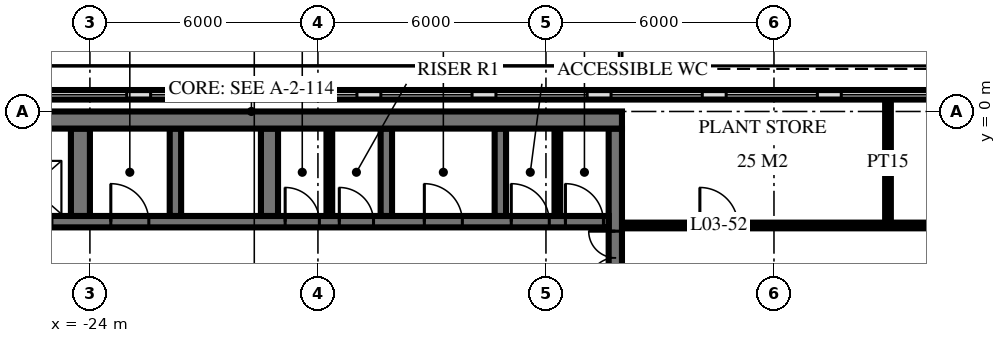
"""IFC4 building model, lengths in metres.
Left out: names, types, materials, properties, quantities, classifications, styles, units other than length and angle.
Written with IfcOpenShell. Run it as: python <this file> out.ifc"""

import sys

from ifc_helpers import new_model, si_unit, direction, frame, frame_2d, origin, place, context, subcontext, project, spatial, rectangle, extrude, element, fill, save


model = new_model("IFC4")
c1 = context("Model", 3, precision=1e-05, world=origin(), true_north=direction((0.0, 1.0)))
c2 = subcontext(c1, "Body", "Model", "MODEL_VIEW")
j1 = project(units=[si_unit("LENGTHUNIT", "METRE"), si_unit("PLANEANGLEUNIT", "RADIAN")], contexts=[c1])
p1 = place(None, origin())
s1 = spatial("IfcSite", under=j1, at=p1, CompositionType="ELEMENT")
p2 = place(p1, origin())
s2 = spatial("IfcBuilding", under=s1, at=p2, CompositionType="ELEMENT")
p3 = place(p2, frame((0.0, 0.0, 18.0)))
s3 = spatial("IfcBuildingStorey", under=s2, at=p3, CompositionType="ELEMENT", Elevation=18.0)
p4 = place(p3, frame((-29.5, -0.225, 0.0), z_axis=(0.0, 0.0, 1.0), x_axis=(1.0, 0.0, 0.0)))
e1 = element("IfcWall", 1, at=p4, inside=s3, PredefinedType="SHEAR", context=c2, shape_type="SweptSolid", body=[
    extrude(rectangle(XDim=19.5, YDim=0.45, at=frame_2d((9.75, 0.0))), origin(), (0.0, 0.0, 1.0), 6.0),
])
p5 = place(p3, frame((-10.175, -14.55, 0.0), z_axis=(0.0, 0.0, 1.0), x_axis=(0.0, 1.0, 0.0)))
e2 = element("IfcWall", 2, at=p5, inside=s3, PredefinedType="SHEAR", context=c2, shape_type="SweptSolid", body=[
    extrude(rectangle(XDim=14.1, YDim=0.35, at=frame_2d((7.05, 0.0))), origin(), (0.0, 0.0, 1.0), 6.0),
])
p6 = place(p5, frame((8.4, 0.0, 0.0)))
e3 = element("IfcOpeningElement", 3, at=p6, cuts=e2, PredefinedType="OPENING", context=c2, shape_type="SweptSolid", body=[
    extrude(rectangle(XDim=1.4, YDim=2.4, at=frame_2d((0.7, 1.2))), frame((0.0, 0.185, 0.0), z_axis=(0.0, -1.0, 0.0), x_axis=(1.0, 0.0, 0.0)), (0.0, 0.0, 1.0), 0.37),
])
p7 = place(p5, frame((10.0, 0.0, 0.0)))
e4 = element("IfcOpeningElement", 4, at=p7, cuts=e2, PredefinedType="OPENING", context=c2, shape_type="SweptSolid", body=[
    extrude(rectangle(XDim=1.4, YDim=2.4, at=frame_2d((0.7, 1.2))), frame((0.0, 0.185, 0.0), z_axis=(0.0, -1.0, 0.0), x_axis=(1.0, 0.0, 0.0)), (0.0, 0.0, 1.0), 0.37),
])
p8 = place(p5, frame((4.0, 0.0, 0.0)))
e5 = element("IfcOpeningElement", 5, at=p8, cuts=e2, PredefinedType="OPENING", context=c2, shape_type="SweptSolid", body=[
    extrude(rectangle(XDim=1.2, YDim=2.1, at=frame_2d((0.6, 1.05))), frame((0.0, 0.185, 0.0), z_axis=(0.0, -1.0, 0.0), x_axis=(1.0, 0.0, 0.0)), (0.0, 0.0, 1.0), 0.37),
])
p9 = place(p3, frame((-29.05, -2.9, 0.0), z_axis=(0.0, 0.0, 1.0), x_axis=(1.0, 0.0, 0.0)))
e6 = element("IfcWall", 6, at=p9, inside=s3, PredefinedType="SHEAR", context=c2, shape_type="SweptSolid", body=[
    extrude(rectangle(XDim=18.7, YDim=0.3, at=frame_2d((9.35, 0.0))), origin(), (0.0, 0.0, 1.0), 6.0),
])
p10 = place(p9, frame((2.95, 0.0, 0.0)))
e7 = element("IfcOpeningElement", 7, at=p10, cuts=e6, PredefinedType="OPENING", context=c2, shape_type="SweptSolid", body=[
    extrude(rectangle(XDim=1.1, YDim=2.1, at=frame_2d((0.55, 1.05))), frame((0.0, 0.16, 0.0), z_axis=(0.0, -1.0, 0.0), x_axis=(1.0, 0.0, 0.0)), (0.0, 0.0, 1.0), 0.32),
])
p11 = place(p9, frame((0.55, 0.0, 0.0)))
e8 = element("IfcOpeningElement", 8, at=p11, cuts=e6, PredefinedType="OPENING", context=c2, shape_type="SweptSolid", body=[
    extrude(rectangle(XDim=1.1, YDim=2.1, at=frame_2d((0.55, 1.05))), frame((0.0, 0.16, 0.0), z_axis=(0.0, -1.0, 0.0), x_axis=(1.0, 0.0, 0.0)), (0.0, 0.0, 1.0), 0.32),
])
p12 = place(p9, frame((11.613, 0.0, 0.0)))
e9 = element("IfcOpeningElement", 9, at=p12, cuts=e6, PredefinedType="OPENING", context=c2, shape_type="SweptSolid", body=[
    extrude(rectangle(XDim=0.9, YDim=2.1, at=frame_2d((0.45, 1.05))), frame((0.0, 0.16, 0.0), z_axis=(0.0, -1.0, 0.0), x_axis=(1.0, 0.0, 0.0)), (0.0, 0.0, 1.0), 0.32),
])
p13 = place(p9, frame((10.188, 0.0, 0.0)))
e10 = element("IfcOpeningElement", 10, at=p13, cuts=e6, PredefinedType="OPENING", context=c2, shape_type="SweptSolid", body=[
    extrude(rectangle(XDim=0.9, YDim=2.1, at=frame_2d((0.45, 1.05))), frame((0.0, 0.16, 0.0), z_axis=(0.0, -1.0, 0.0), x_axis=(1.0, 0.0, 0.0)), (0.0, 0.0, 1.0), 0.32),
])
p14 = place(p9, frame((17.562, 0.0, 0.0)))
e11 = element("IfcOpeningElement", 11, at=p14, cuts=e6, PredefinedType="OPENING", context=c2, shape_type="SweptSolid", body=[
    extrude(rectangle(XDim=1.0, YDim=2.1, at=frame_2d((0.5, 1.05))), frame((0.0, 0.16, 0.0), z_axis=(0.0, -1.0, 0.0), x_axis=(1.0, 0.0, 0.0)), (0.0, 0.0, 1.0), 0.32),
])
p15 = place(p9, frame((16.137, 0.0, 0.0)))
e12 = element("IfcOpeningElement", 12, at=p15, cuts=e6, PredefinedType="OPENING", context=c2, shape_type="SweptSolid", body=[
    extrude(rectangle(XDim=1.0, YDim=2.1, at=frame_2d((0.5, 1.05))), frame((0.0, 0.16, 0.0), z_axis=(0.0, -1.0, 0.0), x_axis=(1.0, 0.0, 0.0)), (0.0, 0.0, 1.0), 0.32),
])
p16 = place(p9, frame((13.85, 0.0, 0.0)))
e13 = element("IfcOpeningElement", 13, at=p16, cuts=e6, PredefinedType="OPENING", context=c2, shape_type="SweptSolid", body=[
    extrude(rectangle(XDim=1.0, YDim=2.1, at=frame_2d((0.5, 1.05))), frame((0.0, 0.16, 0.0), z_axis=(0.0, -1.0, 0.0), x_axis=(1.0, 0.0, 0.0)), (0.0, 0.0, 1.0), 0.32),
])
p17 = place(p9, frame((5.6, 0.0, 0.0)))
e14 = element("IfcOpeningElement", 14, at=p17, cuts=e6, PredefinedType="OPENING", context=c2, shape_type="SweptSolid", body=[
    extrude(rectangle(XDim=1.0, YDim=2.1, at=frame_2d((0.5, 1.05))), frame((0.0, 0.16, 0.0), z_axis=(0.0, -1.0, 0.0), x_axis=(1.0, 0.0, 0.0)), (0.0, 0.0, 1.0), 0.32),
])
for number, where, z_axis, x_axis in (
    (15, (-13.2, -2.75, 0.0), (0.0, 0.0, 1.0), (0.0, 1.0, 0.0)),
    (16, (-16.2, -2.75, 0.0), (0.0, 0.0, 1.0), (0.0, 1.0, 0.0)),
):
    element("IfcWall", number, at=place(p3, frame(where, z_axis=z_axis, x_axis=x_axis)), inside=s3, PredefinedType="SHEAR", context=c2, shape_type="SweptSolid", body=[
        extrude(rectangle(XDim=2.3, YDim=0.3, at=frame_2d((1.15, 0.0))), origin(), (0.0, 0.0, 1.0), 6.0),
    ])
p18 = place(p3, frame((-19.275, -2.75, 0.0), z_axis=(0.0, 0.0, 1.0), x_axis=(0.0, 1.0, 0.0)))
e17 = element("IfcWall", 17, at=p18, inside=s3, PredefinedType="SHEAR", context=c2, shape_type="SweptSolid", body=[
    extrude(rectangle(XDim=2.3, YDim=0.45, at=frame_2d((1.15, 0.0))), origin(), (0.0, 0.0, 1.0), 6.0),
])
p19 = place(p3, frame((-21.75, -2.75, 0.0), z_axis=(0.0, 0.0, 1.0), x_axis=(0.0, 1.0, 0.0)))
e18 = element("IfcWall", 18, at=p19, inside=s3, PredefinedType="SHEAR", context=c2, shape_type="SweptSolid", body=[
    extrude(rectangle(XDim=2.3, YDim=0.3, at=frame_2d((1.15, 0.0))), origin(), (0.0, 0.0, 1.0), 6.0),
])
p20 = place(p3, frame((-24.25, -2.75, 0.0), z_axis=(0.0, 0.0, 1.0), x_axis=(0.0, 1.0, 0.0)))
e19 = element("IfcWall", 19, at=p20, inside=s3, PredefinedType="SHEAR", context=c2, shape_type="SweptSolid", body=[
    extrude(rectangle(XDim=2.3, YDim=0.5, at=frame_2d((1.15, 0.0))), origin(), (0.0, 0.0, 1.0), 6.0),
])
p21 = place(p3, frame((28.713, 0.439, 0.0), z_axis=(0.0, 0.0, 1.0), x_axis=(-1.0, 0.0, 0.0)))
e20 = element("IfcWall", 20, at=p21, inside=s3, PredefinedType="SOLIDWALL", context=c2, shape_type="SweptSolid", body=[
    extrude(rectangle(XDim=57.426, YDim=0.25, at=frame_2d((28.713, 0.0))), origin(), (0.0, 0.0, 1.0), 5.72),
])
p22 = place(p21, frame((0.252, 0.0, 0.858)))
e21 = element("IfcOpeningElement", 21, at=p22, cuts=e20, PredefinedType="OPENING", context=c2, shape_type="SweptSolid", body=[
    extrude(rectangle(XDim=2.4, YDim=3.6, at=frame_2d((1.2, 1.8))), frame((0.0, 0.135, 0.0), z_axis=(0.0, -1.0, 0.0), x_axis=(1.0, 0.0, 0.0)), (0.0, 0.0, 1.0), 0.27),
])
p23 = place(p21, frame((3.281, 0.0, 0.858)))
e22 = element("IfcOpeningElement", 22, at=p23, cuts=e20, PredefinedType="OPENING", context=c2, shape_type="SweptSolid", body=[
    extrude(rectangle(XDim=2.4, YDim=3.6, at=frame_2d((1.2, 1.8))), frame((0.0, 0.135, 0.0), z_axis=(0.0, -1.0, 0.0), x_axis=(1.0, 0.0, 0.0)), (0.0, 0.0, 1.0), 0.27),
])
p24 = place(p21, frame((6.31, 0.0, 0.858)))
e23 = element("IfcOpeningElement", 23, at=p24, cuts=e20, PredefinedType="OPENING", context=c2, shape_type="SweptSolid", body=[
    extrude(rectangle(XDim=2.4, YDim=3.6, at=frame_2d((1.2, 1.8))), frame((0.0, 0.135, 0.0), z_axis=(0.0, -1.0, 0.0), x_axis=(1.0, 0.0, 0.0)), (0.0, 0.0, 1.0), 0.27),
])
p25 = place(p21, frame((9.339, 0.0, 0.858)))
e24 = element("IfcOpeningElement", 24, at=p25, cuts=e20, PredefinedType="OPENING", context=c2, shape_type="SweptSolid", body=[
    extrude(rectangle(XDim=2.4, YDim=3.6, at=frame_2d((1.2, 1.8))), frame((0.0, 0.135, 0.0), z_axis=(0.0, -1.0, 0.0), x_axis=(1.0, 0.0, 0.0)), (0.0, 0.0, 1.0), 0.27),
])
p26 = place(p21, frame((12.368, 0.0, 0.858)))
e25 = element("IfcOpeningElement", 25, at=p26, cuts=e20, PredefinedType="OPENING", context=c2, shape_type="SweptSolid", body=[
    extrude(rectangle(XDim=2.4, YDim=3.6, at=frame_2d((1.2, 1.8))), frame((0.0, 0.135, 0.0), z_axis=(0.0, -1.0, 0.0), x_axis=(1.0, 0.0, 0.0)), (0.0, 0.0, 1.0), 0.27),
])
p27 = place(p21, frame((15.397, 0.0, 0.858)))
e26 = element("IfcOpeningElement", 26, at=p27, cuts=e20, PredefinedType="OPENING", context=c2, shape_type="SweptSolid", body=[
    extrude(rectangle(XDim=2.4, YDim=3.6, at=frame_2d((1.2, 1.8))), frame((0.0, 0.135, 0.0), z_axis=(0.0, -1.0, 0.0), x_axis=(1.0, 0.0, 0.0)), (0.0, 0.0, 1.0), 0.27),
])
p28 = place(p21, frame((18.426, 0.0, 0.858)))
e27 = element("IfcOpeningElement", 27, at=p28, cuts=e20, PredefinedType="OPENING", context=c2, shape_type="SweptSolid", body=[
    extrude(rectangle(XDim=2.4, YDim=3.6, at=frame_2d((1.2, 1.8))), frame((0.0, 0.135, 0.0), z_axis=(0.0, -1.0, 0.0), x_axis=(1.0, 0.0, 0.0)), (0.0, 0.0, 1.0), 0.27),
])
p29 = place(p21, frame((21.455, 0.0, 0.858)))
e28 = element("IfcOpeningElement", 28, at=p29, cuts=e20, PredefinedType="OPENING", context=c2, shape_type="SweptSolid", body=[
    extrude(rectangle(XDim=2.4, YDim=3.6, at=frame_2d((1.2, 1.8))), frame((0.0, 0.135, 0.0), z_axis=(0.0, -1.0, 0.0), x_axis=(1.0, 0.0, 0.0)), (0.0, 0.0, 1.0), 0.27),
])
p30 = place(p21, frame((24.484, 0.0, 0.858)))
e29 = element("IfcOpeningElement", 29, at=p30, cuts=e20, PredefinedType="OPENING", context=c2, shape_type="SweptSolid", body=[
    extrude(rectangle(XDim=2.4, YDim=3.6, at=frame_2d((1.2, 1.8))), frame((0.0, 0.135, 0.0), z_axis=(0.0, -1.0, 0.0), x_axis=(1.0, 0.0, 0.0)), (0.0, 0.0, 1.0), 0.27),
])
p31 = place(p21, frame((27.513, 0.0, 0.858)))
e30 = element("IfcOpeningElement", 30, at=p31, cuts=e20, PredefinedType="OPENING", context=c2, shape_type="SweptSolid", body=[
    extrude(rectangle(XDim=2.4, YDim=3.6, at=frame_2d((1.2, 1.8))), frame((0.0, 0.135, 0.0), z_axis=(0.0, -1.0, 0.0), x_axis=(1.0, 0.0, 0.0)), (0.0, 0.0, 1.0), 0.27),
])
p32 = place(p21, frame((30.542, 0.0, 0.858)))
e31 = element("IfcOpeningElement", 31, at=p32, cuts=e20, PredefinedType="OPENING", context=c2, shape_type="SweptSolid", body=[
    extrude(rectangle(XDim=2.4, YDim=3.6, at=frame_2d((1.2, 1.8))), frame((0.0, 0.135, 0.0), z_axis=(0.0, -1.0, 0.0), x_axis=(1.0, 0.0, 0.0)), (0.0, 0.0, 1.0), 0.27),
])
p33 = place(p21, frame((33.571, 0.0, 0.858)))
e32 = element("IfcOpeningElement", 32, at=p33, cuts=e20, PredefinedType="OPENING", context=c2, shape_type="SweptSolid", body=[
    extrude(rectangle(XDim=2.4, YDim=3.6, at=frame_2d((1.2, 1.8))), frame((0.0, 0.135, 0.0), z_axis=(0.0, -1.0, 0.0), x_axis=(1.0, 0.0, 0.0)), (0.0, 0.0, 1.0), 0.27),
])
p34 = place(p21, frame((36.6, 0.0, 0.858)))
e33 = element("IfcOpeningElement", 33, at=p34, cuts=e20, PredefinedType="OPENING", context=c2, shape_type="SweptSolid", body=[
    extrude(rectangle(XDim=2.4, YDim=3.6, at=frame_2d((1.2, 1.8))), frame((0.0, 0.135, 0.0), z_axis=(0.0, -1.0, 0.0), x_axis=(1.0, 0.0, 0.0)), (0.0, 0.0, 1.0), 0.27),
])
p35 = place(p21, frame((39.629, 0.0, 0.858)))
e34 = element("IfcOpeningElement", 34, at=p35, cuts=e20, PredefinedType="OPENING", context=c2, shape_type="SweptSolid", body=[
    extrude(rectangle(XDim=2.4, YDim=3.6, at=frame_2d((1.2, 1.8))), frame((0.0, 0.135, 0.0), z_axis=(0.0, -1.0, 0.0), x_axis=(1.0, 0.0, 0.0)), (0.0, 0.0, 1.0), 0.27),
])
p36 = place(p21, frame((42.658, 0.0, 0.858)))
e35 = element("IfcOpeningElement", 35, at=p36, cuts=e20, PredefinedType="OPENING", context=c2, shape_type="SweptSolid", body=[
    extrude(rectangle(XDim=2.4, YDim=3.6, at=frame_2d((1.2, 1.8))), frame((0.0, 0.135, 0.0), z_axis=(0.0, -1.0, 0.0), x_axis=(1.0, 0.0, 0.0)), (0.0, 0.0, 1.0), 0.27),
])
p37 = place(p21, frame((45.687, 0.0, 0.858)))
e36 = element("IfcOpeningElement", 36, at=p37, cuts=e20, PredefinedType="OPENING", context=c2, shape_type="SweptSolid", body=[
    extrude(rectangle(XDim=2.4, YDim=3.6, at=frame_2d((1.2, 1.8))), frame((0.0, 0.135, 0.0), z_axis=(0.0, -1.0, 0.0), x_axis=(1.0, 0.0, 0.0)), (0.0, 0.0, 1.0), 0.27),
])
p38 = place(p21, frame((48.716, 0.0, 0.858)))
e37 = element("IfcOpeningElement", 37, at=p38, cuts=e20, PredefinedType="OPENING", context=c2, shape_type="SweptSolid", body=[
    extrude(rectangle(XDim=2.4, YDim=3.6, at=frame_2d((1.2, 1.8))), frame((0.0, 0.135, 0.0), z_axis=(0.0, -1.0, 0.0), x_axis=(1.0, 0.0, 0.0)), (0.0, 0.0, 1.0), 0.27),
])
p39 = place(p21, frame((51.745, 0.0, 0.858)))
e38 = element("IfcOpeningElement", 38, at=p39, cuts=e20, PredefinedType="OPENING", context=c2, shape_type="SweptSolid", body=[
    extrude(rectangle(XDim=2.4, YDim=3.6, at=frame_2d((1.2, 1.8))), frame((0.0, 0.135, 0.0), z_axis=(0.0, -1.0, 0.0), x_axis=(1.0, 0.0, 0.0)), (0.0, 0.0, 1.0), 0.27),
])
p40 = place(p21, frame((54.774, 0.0, 0.858)))
e39 = element("IfcOpeningElement", 39, at=p40, cuts=e20, PredefinedType="OPENING", context=c2, shape_type="SweptSolid", body=[
    extrude(rectangle(XDim=2.4, YDim=3.6, at=frame_2d((1.2, 1.8))), frame((0.0, 0.135, 0.0), z_axis=(0.0, -1.0, 0.0), x_axis=(1.0, 0.0, 0.0)), (0.0, 0.0, 1.0), 0.27),
])
for number, where, z_axis, x_axis in (
    (40, (-17.7, -2.75, 0.0), (0.0, 0.0, 1.0), (0.0, 1.0, 0.0)),
    (41, (-11.7, -2.75, 0.0), (0.0, 0.0, 1.0), (0.0, 1.0, 0.0)),
):
    element("IfcWall", number, at=place(p3, frame(where, z_axis=z_axis, x_axis=x_axis)), inside=s3, PredefinedType="PARTITIONING", context=c2, shape_type="SweptSolid", body=[
        extrude(rectangle(XDim=2.3, YDim=0.15, at=frame_2d((1.15, 0.0))), origin(), (0.0, 0.0, 1.0), 5.7),
    ])
p41 = place(p3, frame((-3.0, -3.0, 0.0), z_axis=(0.0, 0.0, 1.0), x_axis=(0.0, 1.0, 0.0)))
e42 = element("IfcWall", 42, at=p41, inside=s3, PredefinedType="PARTITIONING", context=c2, shape_type="SweptSolid", body=[
    extrude(rectangle(XDim=3.312, YDim=0.15, at=frame_2d((1.656, 0.0))), origin(), (0.0, 0.0, 1.0), 5.55),
])
p42 = place(p3, frame((-9.95, -3.0, 0.0), z_axis=(0.0, 0.0, 1.0), x_axis=(1.0, 0.0, 0.0)))
e43 = element("IfcWall", 43, at=p42, inside=s3, PredefinedType="PARTITIONING", context=c2, shape_type="SweptSolid", body=[
    extrude(rectangle(XDim=19.9, YDim=0.15, at=frame_2d((9.95, 0.0))), origin(), (0.0, 0.0, 1.0), 5.55),
])
p43 = place(p42, frame((2.0, 0.0, 0.0)))
e44 = element("IfcOpeningElement", 44, at=p43, cuts=e43, PredefinedType="OPENING", context=c2, shape_type="SweptSolid", body=[
    extrude(rectangle(XDim=1.0, YDim=2.1, at=frame_2d((0.5, 1.05))), frame((0.0, 0.085, 0.0), z_axis=(0.0, -1.0, 0.0), x_axis=(1.0, 0.0, 0.0)), (0.0, 0.0, 1.0), 0.17),
])
p44 = place(p42, frame((11.9, 0.0, 0.0)))
e45 = element("IfcOpeningElement", 45, at=p44, cuts=e43, PredefinedType="OPENING", context=c2, shape_type="SweptSolid", body=[
    extrude(rectangle(XDim=1.0, YDim=2.1, at=frame_2d((0.5, 1.05))), frame((0.0, 0.085, 0.0), z_axis=(0.0, -1.0, 0.0), x_axis=(1.0, 0.0, 0.0)), (0.0, 0.0, 1.0), 0.17),
])
p45 = place(p42, frame((16.9, 0.0, 0.0)))
e46 = element("IfcOpeningElement", 46, at=p45, cuts=e43, PredefinedType="OPENING", context=c2, shape_type="SweptSolid", body=[
    extrude(rectangle(XDim=1.0, YDim=2.1, at=frame_2d((0.5, 1.05))), frame((0.0, 0.085, 0.0), z_axis=(0.0, -1.0, 0.0), x_axis=(1.0, 0.0, 0.0)), (0.0, 0.0, 1.0), 0.17),
])
p46 = place(p32, origin())
e47 = element("IfcWindow", 47, at=p46, inside=s3, PartitioningType="SINGLE_PANEL", PredefinedType="USERDEFINED", context=c2, shape_type="SweptSolid", body=[
    extrude(rectangle(XDim=2.4, YDim=3.6, at=frame_2d((1.2, 1.8))), frame((0.0, 0.125, 0.0), z_axis=(0.0, -1.0, 0.0), x_axis=(1.0, 0.0, 0.0)), (0.0, 0.0, 1.0), 0.06),
])
fill(e31, e47)
p47 = place(p33, origin())
e48 = element("IfcWindow", 48, at=p47, inside=s3, PartitioningType="SINGLE_PANEL", PredefinedType="USERDEFINED", context=c2, shape_type="SweptSolid", body=[
    extrude(rectangle(XDim=2.4, YDim=3.6, at=frame_2d((1.2, 1.8))), frame((0.0, 0.125, 0.0), z_axis=(0.0, -1.0, 0.0), x_axis=(1.0, 0.0, 0.0)), (0.0, 0.0, 1.0), 0.06),
])
fill(e32, e48)
p48 = place(p34, origin())
e49 = element("IfcWindow", 49, at=p48, inside=s3, PartitioningType="SINGLE_PANEL", PredefinedType="USERDEFINED", context=c2, shape_type="SweptSolid", body=[
    extrude(rectangle(XDim=2.4, YDim=3.6, at=frame_2d((1.2, 1.8))), frame((0.0, 0.125, 0.0), z_axis=(0.0, -1.0, 0.0), x_axis=(1.0, 0.0, 0.0)), (0.0, 0.0, 1.0), 0.06),
])
fill(e33, e49)
p49 = place(p35, origin())
e50 = element("IfcWindow", 50, at=p49, inside=s3, PartitioningType="SINGLE_PANEL", PredefinedType="USERDEFINED", context=c2, shape_type="SweptSolid", body=[
    extrude(rectangle(XDim=2.4, YDim=3.6, at=frame_2d((1.2, 1.8))), frame((0.0, 0.125, 0.0), z_axis=(0.0, -1.0, 0.0), x_axis=(1.0, 0.0, 0.0)), (0.0, 0.0, 1.0), 0.06),
])
fill(e34, e50)
p50 = place(p36, origin())
e51 = element("IfcWindow", 51, at=p50, inside=s3, PartitioningType="SINGLE_PANEL", PredefinedType="USERDEFINED", context=c2, shape_type="SweptSolid", body=[
    extrude(rectangle(XDim=2.4, YDim=3.6, at=frame_2d((1.2, 1.8))), frame((0.0, 0.125, 0.0), z_axis=(0.0, -1.0, 0.0), x_axis=(1.0, 0.0, 0.0)), (0.0, 0.0, 1.0), 0.06),
])
fill(e35, e51)
p51 = place(p37, origin())
e52 = element("IfcWindow", 52, at=p51, inside=s3, PartitioningType="SINGLE_PANEL", PredefinedType="USERDEFINED", context=c2, shape_type="SweptSolid", body=[
    extrude(rectangle(XDim=2.4, YDim=3.6, at=frame_2d((1.2, 1.8))), frame((0.0, 0.125, 0.0), z_axis=(0.0, -1.0, 0.0), x_axis=(1.0, 0.0, 0.0)), (0.0, 0.0, 1.0), 0.06),
])
fill(e36, e52)
p52 = place(p38, origin())
e53 = element("IfcWindow", 53, at=p52, inside=s3, PartitioningType="SINGLE_PANEL", PredefinedType="USERDEFINED", context=c2, shape_type="SweptSolid", body=[
    extrude(rectangle(XDim=2.4, YDim=3.6, at=frame_2d((1.2, 1.8))), frame((0.0, 0.125, 0.0), z_axis=(0.0, -1.0, 0.0), x_axis=(1.0, 0.0, 0.0)), (0.0, 0.0, 1.0), 0.06),
])
fill(e37, e53)
p53 = place(p39, origin())
e54 = element("IfcWindow", 54, at=p53, inside=s3, PartitioningType="SINGLE_PANEL", PredefinedType="USERDEFINED", context=c2, shape_type="SweptSolid", body=[
    extrude(rectangle(XDim=2.4, YDim=3.6, at=frame_2d((1.2, 1.8))), frame((0.0, 0.125, 0.0), z_axis=(0.0, -1.0, 0.0), x_axis=(1.0, 0.0, 0.0)), (0.0, 0.0, 1.0), 0.06),
])
fill(e38, e54)
p54 = place(p7, origin())
e55 = element("IfcDoor", 55, at=p54, inside=s3, OperationType="DOUBLE_DOOR_SINGLE_SWING", PredefinedType="DOOR", context=c2, shape_type="SweptSolid", body=[
    extrude(rectangle(XDim=1.4, YDim=2.4, at=frame_2d((0.7, 1.2))), frame((0.0, 0.025, 0.0), z_axis=(0.0, -1.0, 0.0), x_axis=(1.0, 0.0, 0.0)), (0.0, 0.0, 1.0), 0.05),
])
fill(e4, e55)
p55 = place(p12, origin())
e56 = element("IfcDoor", 56, at=p55, inside=s3, OperationType="SINGLE_SWING_RIGHT", PredefinedType="DOOR", context=c2, shape_type="SweptSolid", body=[
    extrude(rectangle(XDim=0.9, YDim=2.1, at=frame_2d((0.45, 1.05))), frame((0.0, 0.025, 0.0), z_axis=(0.0, -1.0, 0.0), x_axis=(1.0, 0.0, 0.0)), (0.0, 0.0, 1.0), 0.05),
])
fill(e9, e56)
p56 = place(p13, origin())
e57 = element("IfcDoor", 57, at=p56, inside=s3, OperationType="SINGLE_SWING_RIGHT", PredefinedType="DOOR", context=c2, shape_type="SweptSolid", body=[
    extrude(rectangle(XDim=0.9, YDim=2.1, at=frame_2d((0.45, 1.05))), frame((0.0, 0.025, 0.0), z_axis=(0.0, -1.0, 0.0), x_axis=(1.0, 0.0, 0.0)), (0.0, 0.0, 1.0), 0.05),
])
fill(e10, e57)
p57 = place(p14, origin())
e58 = element("IfcDoor", 58, at=p57, inside=s3, OperationType="SINGLE_SWING_RIGHT", PredefinedType="DOOR", context=c2, shape_type="SweptSolid", body=[
    extrude(rectangle(XDim=1.0, YDim=2.1, at=frame_2d((0.5, 1.05))), frame((0.0, 0.025, 0.0), z_axis=(0.0, -1.0, 0.0), x_axis=(1.0, 0.0, 0.0)), (0.0, 0.0, 1.0), 0.05),
])
fill(e11, e58)
p58 = place(p15, origin())
e59 = element("IfcDoor", 59, at=p58, inside=s3, OperationType="SINGLE_SWING_RIGHT", PredefinedType="DOOR", context=c2, shape_type="SweptSolid", body=[
    extrude(rectangle(XDim=1.0, YDim=2.1, at=frame_2d((0.5, 1.05))), frame((0.0, 0.025, 0.0), z_axis=(0.0, -1.0, 0.0), x_axis=(1.0, 0.0, 0.0)), (0.0, 0.0, 1.0), 0.05),
])
fill(e12, e59)
p59 = place(p16, origin())
e60 = element("IfcDoor", 60, at=p59, inside=s3, OperationType="SINGLE_SWING_RIGHT", PredefinedType="DOOR", context=c2, shape_type="SweptSolid", body=[
    extrude(rectangle(XDim=1.0, YDim=2.1, at=frame_2d((0.5, 1.05))), frame((0.0, 0.025, 0.0), z_axis=(0.0, -1.0, 0.0), x_axis=(1.0, 0.0, 0.0)), (0.0, 0.0, 1.0), 0.05),
])
fill(e13, e60)
p60 = place(p17, origin())
e61 = element("IfcDoor", 61, at=p60, inside=s3, OperationType="SINGLE_SWING_RIGHT", PredefinedType="DOOR", context=c2, shape_type="SweptSolid", body=[
    extrude(rectangle(XDim=1.0, YDim=2.1, at=frame_2d((0.5, 1.05))), frame((0.0, 0.025, 0.0), z_axis=(0.0, -1.0, 0.0), x_axis=(1.0, 0.0, 0.0)), (0.0, 0.0, 1.0), 0.05),
])
fill(e14, e61)
p61 = place(p43, origin())
e62 = element("IfcDoor", 62, at=p61, inside=s3, OperationType="SINGLE_SWING_RIGHT", PredefinedType="DOOR", context=c2, shape_type="SweptSolid", body=[
    extrude(rectangle(XDim=1.0, YDim=2.1, at=frame_2d((0.5, 1.05))), frame((0.0, 0.025, 0.0), z_axis=(0.0, -1.0, 0.0), x_axis=(1.0, 0.0, 0.0)), (0.0, 0.0, 1.0), 0.05),
])
fill(e44, e62)
save(model, sys.argv[1])
